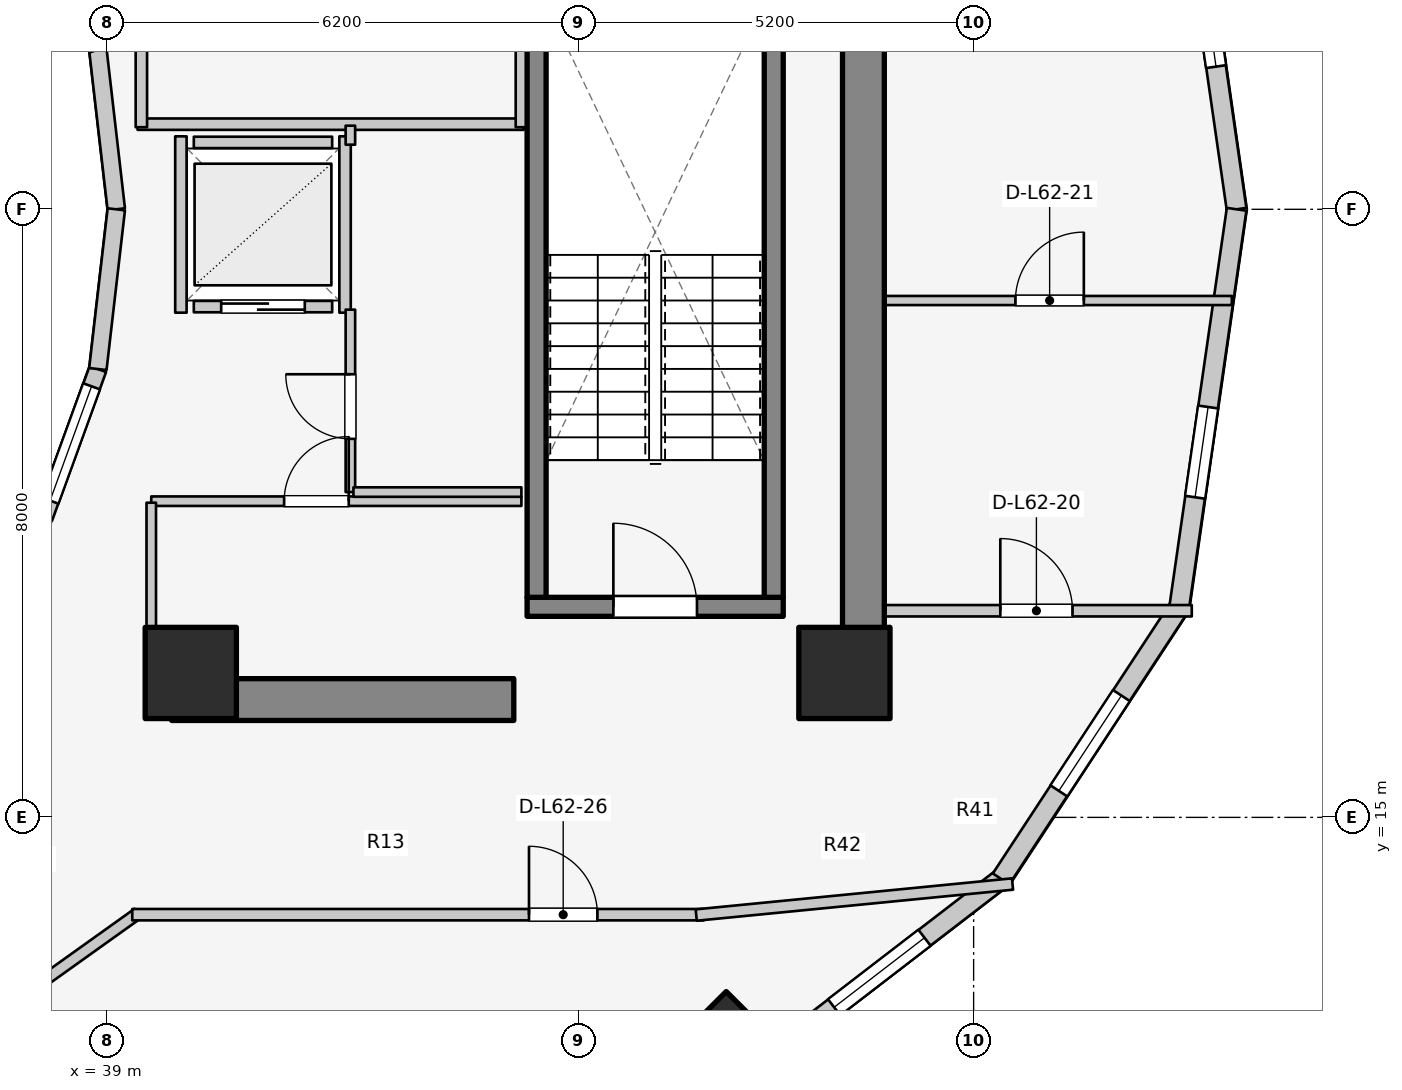
"""IFC4 building model, lengths in metres.
Left out: names, types, materials, properties, quantities, classifications, styles, units other than length and angle.
Written with IfcOpenShell. Run it as: python <this file> out.ifc"""

import sys

from ifc_helpers import new_model, si_unit, direction, frame, frame_2d, origin, origin_2d, place, context, subcontext, project, spatial, rectangle, extrude, element, fill, save


model = new_model("IFC4")
c1 = context("Model", 3, precision=1e-05, world=origin(), true_north=direction((0.0, 1.0)))
c2 = subcontext(c1, "Body", "Model", "MODEL_VIEW")
j1 = project(units=[si_unit("LENGTHUNIT", "METRE"), si_unit("PLANEANGLEUNIT", "RADIAN")], contexts=[c1])
p1 = place(None, origin())
s1 = spatial("IfcSite", under=j1, at=p1, CompositionType="ELEMENT")
p2 = place(p1, origin())
s2 = spatial("IfcBuilding", under=s1, at=p2, CompositionType="ELEMENT")
p3 = place(p2, frame((0.0, 0.0, 204.7)))
s3 = spatial("IfcBuildingStorey", under=s2, at=p3, CompositionType="ELEMENT", Elevation=204.7)
p4 = place(p3, frame((48.95, 17.05, 0.0), z_axis=(0.0, 0.0, 1.0), x_axis=(0.0, 1.0, 0.0)))
e1 = element("IfcWall", 1, at=p4, inside=s3, PredefinedType="SHEAR", context=c2, shape_type="SweptSolid", body=[
    extrude(rectangle(XDim=12.8, YDim=0.55, at=frame_2d((6.4, 0.0))), origin(), (0.0, 0.0, 1.0), 3.1),
])
p5 = place(p3, frame((39.85, 16.55, 0.0), z_axis=(0.0, 0.0, 1.0), x_axis=(1.0, 0.0, 0.0)))
e2 = element("IfcWall", 2, at=p5, inside=s3, PredefinedType="SHEAR", context=c2, shape_type="SweptSolid", body=[
    extrude(rectangle(XDim=4.5, YDim=0.55, at=frame_2d((2.25, 0.0))), origin(), (0.0, 0.0, 1.0), 3.1),
])
p6 = place(p3, frame((44.525, 17.77, 0.0), z_axis=(0.0, 0.0, 1.0), x_axis=(1.0, 0.0, 0.0)))
e3 = element("IfcWall", 3, at=p6, inside=s3, PredefinedType="SOLIDWALL", context=c2, shape_type="SweptSolid", body=[
    extrude(rectangle(XDim=3.37, YDim=0.25, at=frame_2d((1.685, 0.0))), origin(), (0.0, 0.0, 1.0), 3.1),
])
p7 = place(p6, frame((1.135, 0.0, 0.0)))
e4 = element("IfcOpeningElement", 4, at=p7, cuts=e3, PredefinedType="OPENING", context=c2, shape_type="SweptSolid", body=[
    extrude(rectangle(XDim=1.1, YDim=2.1, at=frame_2d((0.55, 1.05))), frame((0.0, 0.135, 0.0), z_axis=(0.0, -1.0, 0.0), x_axis=(1.0, 0.0, 0.0)), (0.0, 0.0, 1.0), 0.27),
])
for number, where, z_axis, x_axis in (
    (5, (44.65, 17.895, 0.0), (0.0, 0.0, 1.0), (0.0, 1.0, 0.0)),
    (6, (47.77, 17.895, 0.0), (0.0, 0.0, 1.0), (0.0, 1.0, 0.0)),
):
    element("IfcWall", number, at=place(p3, frame(where, z_axis=z_axis, x_axis=x_axis)), inside=s3, PredefinedType="SOLIDWALL", context=c2, shape_type="SweptSolid", body=[
        extrude(rectangle(XDim=7.81, YDim=0.25, at=frame_2d((3.905, 0.0))), origin(), (0.0, 0.0, 1.0), 3.1),
    ])
for number, where, z_axis, x_axis in (
    (7, (40.1, 16.9, 0.0), (0.0, 0.0, 1.0), (1.0, 0.0, 0.0)),
    (8, (48.7, 16.9, 0.0), (0.0, 0.0, 1.0), (1.0, 0.0, 0.0)),
):
    element("IfcColumn", number, at=place(p3, frame(where, z_axis=z_axis, x_axis=x_axis)), inside=s3, PredefinedType="COLUMN", context=c2, shape_type="SweptSolid", body=[
        extrude(rectangle(XDim=1.2, YDim=1.2, at=origin_2d()), origin(), (0.0, 0.0, 1.0), 3.1),
    ])
p8 = place(p3, frame((47.145, 12.143, 0.0), z_axis=(0.0, 0.0, 1.0), x_axis=(0.707106781187, -0.707106781187, 0.0)))
e9 = element("IfcColumn", 9, at=p8, inside=s3, PredefinedType="COLUMN", context=c2, shape_type="SweptSolid", body=[
    extrude(rectangle(XDim=0.8, YDim=0.8, at=origin_2d()), origin(), (0.0, 0.0, 1.0), 3.1),
])
p9 = place(p3, frame((39.12, 23.0, 0.0), z_axis=(0.0, 0.0, 1.0), x_axis=(-0.114711713601, 0.993398823617, 0.0)))
e10 = element("IfcWall", 10, at=p9, inside=s3, PredefinedType="STANDARD", context=c2, shape_type="SweptSolid", body=[
    extrude(rectangle(XDim=2.115, YDim=0.23, at=frame_2d((1.058, 0.0))), origin(), (0.0, 0.0, 1.0), 2.84),
])
p10 = place(p3, frame((38.166, 18.94, 0.0), z_axis=(0.0, 0.0, 1.0), x_axis=(0.341423187295, 0.93990968033, 0.0)))
e11 = element("IfcWall", 11, at=p10, inside=s3, PredefinedType="STANDARD", context=c2, shape_type="SweptSolid", body=[
    extrude(rectangle(XDim=2.084, YDim=0.23, at=frame_2d((1.042, 0.0))), origin(), (0.0, 0.0, 1.0), 2.84),
])
p11 = place(p10, frame((0.242, 0.0, 0.85)))
e12 = element("IfcOpeningElement", 12, at=p11, cuts=e11, PredefinedType="OPENING", context=c2, shape_type="SweptSolid", body=[
    extrude(rectangle(XDim=1.6, YDim=1.65, at=frame_2d((0.8, 0.825))), frame((0.0, 0.125, 0.0), z_axis=(0.0, -1.0, 0.0), x_axis=(1.0, 0.0, 0.0)), (0.0, 0.0, 1.0), 0.25),
])
p12 = place(p3, frame((38.877, 20.898, 0.0), z_axis=(0.0, 0.0, 1.0), x_axis=(0.114711713601, 0.993398823617, 0.0)))
e13 = element("IfcWall", 13, at=p12, inside=s3, PredefinedType="STANDARD", context=c2, shape_type="SweptSolid", body=[
    extrude(rectangle(XDim=2.115, YDim=0.23, at=frame_2d((1.058, 0.0))), origin(), (0.0, 0.0, 1.0), 2.84),
])
p13 = place(p3, frame((53.86, 23.0, 0.0), z_axis=(0.0, 0.0, 1.0), x_axis=(-0.142712754019, 0.989764148593, 0.0)))
e14 = element("IfcWall", 14, at=p13, inside=s3, PredefinedType="STANDARD", context=c2, shape_type="SweptSolid", body=[
    extrude(rectangle(XDim=5.293, YDim=0.26, at=frame_2d((2.646, 0.0))), origin(), (0.0, 0.0, 1.0), 2.85),
])
p14 = place(p13, frame((1.896, 0.0, 0.75)))
e15 = element("IfcOpeningElement", 15, at=p14, cuts=e14, PredefinedType="OPENING", context=c2, shape_type="SweptSolid", body=[
    extrude(rectangle(XDim=1.5, YDim=1.6, at=frame_2d((0.75, 0.8))), frame((0.0, 0.14, 0.0), z_axis=(0.0, -1.0, 0.0), x_axis=(1.0, 0.0, 0.0)), (0.0, 0.0, 1.0), 0.28),
])
p15 = place(p3, frame((47.558, 11.728, 0.0), z_axis=(0.0, 0.0, 1.0), x_axis=(0.792713817907, 0.609593965603, 0.0)))
e16 = element("IfcWall", 16, at=p15, inside=s3, PredefinedType="STANDARD", context=c2, shape_type="SweptSolid", body=[
    extrude(rectangle(XDim=4.041, YDim=0.26, at=frame_2d((2.021, 0.0))), origin(), (0.0, 0.0, 1.0), 2.85),
])
p16 = place(p15, frame((1.271, 0.0, 0.75)))
e17 = element("IfcOpeningElement", 17, at=p16, cuts=e16, PredefinedType="OPENING", context=c2, shape_type="SweptSolid", body=[
    extrude(rectangle(XDim=1.5, YDim=1.6, at=frame_2d((0.75, 0.8))), frame((0.0, 0.14, 0.0), z_axis=(0.0, -1.0, 0.0), x_axis=(1.0, 0.0, 0.0)), (0.0, 0.0, 1.0), 0.28),
])
p17 = place(p3, frame((50.761, 14.191, 0.0), z_axis=(0.0, 0.0, 1.0), x_axis=(0.548776305075, 0.835969238064, 0.0)))
e18 = element("IfcWall", 18, at=p17, inside=s3, PredefinedType="STANDARD", context=c2, shape_type="SweptSolid", body=[
    extrude(rectangle(XDim=4.271, YDim=0.26, at=frame_2d((2.135, 0.0))), origin(), (0.0, 0.0, 1.0), 2.85),
])
p18 = place(p17, frame((1.385, 0.0, 0.75)))
e19 = element("IfcOpeningElement", 19, at=p18, cuts=e18, PredefinedType="OPENING", context=c2, shape_type="SweptSolid", body=[
    extrude(rectangle(XDim=1.5, YDim=1.6, at=frame_2d((0.75, 0.8))), frame((0.0, 0.14, 0.0), z_axis=(0.0, -1.0, 0.0), x_axis=(1.0, 0.0, 0.0)), (0.0, 0.0, 1.0), 0.28),
])
p19 = place(p3, frame((53.105, 17.761, 0.0), z_axis=(0.0, 0.0, 1.0), x_axis=(0.142712754019, 0.989764148593, 0.0)))
e20 = element("IfcWall", 20, at=p19, inside=s3, PredefinedType="STANDARD", context=c2, shape_type="SweptSolid", body=[
    extrude(rectangle(XDim=5.293, YDim=0.26, at=frame_2d((2.646, 0.0))), origin(), (0.0, 0.0, 1.0), 2.85),
])
p20 = place(p19, frame((1.465, 0.0, 0.75)))
e21 = element("IfcOpeningElement", 21, at=p20, cuts=e20, PredefinedType="OPENING", context=c2, shape_type="SweptSolid", body=[
    extrude(rectangle(XDim=1.2, YDim=1.5, at=frame_2d((0.6, 0.75))), frame((0.0, 0.14, 0.0), z_axis=(0.0, -1.0, 0.0), x_axis=(1.0, 0.0, 0.0)), (0.0, 0.0, 1.0), 0.28),
])
p21 = place(p3, frame((40.14, 21.72, 0.0), z_axis=(0.0, 0.0, 1.0), x_axis=(1.0, 0.0, 0.0)))
e22 = element("IfcWall", 22, at=p21, inside=s3, PredefinedType="SOLIDWALL", context=c2, shape_type="SweptSolid", body=[
    extrude(rectangle(XDim=1.82, YDim=0.15, at=frame_2d((0.91, 0.0))), origin(), (0.0, 0.0, 1.0), 2.12),
])
p22 = place(p21, frame((0.36, 0.0, 0.0)))
e23 = element("IfcOpeningElement", 23, at=p22, cuts=e22, PredefinedType="OPENING", context=c2, shape_type="SweptSolid", body=[
    extrude(rectangle(XDim=1.1, YDim=2.1, at=frame_2d((0.55, 1.05))), frame((0.0, 0.085, 0.0), z_axis=(0.0, -1.0, 0.0), x_axis=(1.0, 0.0, 0.0)), (0.0, 0.0, 1.0), 0.17),
])
p23 = place(p3, frame((40.14, 23.88, 0.0), z_axis=(0.0, 0.0, 1.0), x_axis=(1.0, 0.0, 0.0)))
e24 = element("IfcWall", 24, at=p23, inside=s3, PredefinedType="SOLIDWALL", context=c2, shape_type="SweptSolid", body=[
    extrude(rectangle(XDim=1.82, YDim=0.15, at=frame_2d((0.91, 0.0))), origin(), (0.0, 0.0, 1.0), 2.12),
])
p24 = place(p3, frame((39.97, 21.64, 0.0), z_axis=(0.0, 0.0, 1.0), x_axis=(0.0, 1.0, 0.0)))
e25 = element("IfcWall", 25, at=p24, inside=s3, PredefinedType="SOLIDWALL", context=c2, shape_type="SweptSolid", body=[
    extrude(rectangle(XDim=2.32, YDim=0.15, at=frame_2d((1.16, 0.0))), origin(), (0.0, 0.0, 1.0), 2.12),
])
p25 = place(p3, frame((42.13, 21.64, 0.0), z_axis=(0.0, 0.0, 1.0), x_axis=(0.0, 1.0, 0.0)))
e26 = element("IfcWall", 26, at=p25, inside=s3, PredefinedType="SOLIDWALL", context=c2, shape_type="SweptSolid", body=[
    extrude(rectangle(XDim=2.32, YDim=0.15, at=frame_2d((1.16, 0.0))), origin(), (0.0, 0.0, 1.0), 2.855),
])
p26 = place(p3, frame((39.4, 24.12, 0.0), z_axis=(0.0, 0.0, 1.0), x_axis=(1.0, 0.0, 0.0)))
e27 = element("IfcWall", 27, at=p26, inside=s3, PredefinedType="PARTITIONING", context=c2, shape_type="SweptSolid", body=[
    extrude(rectangle(XDim=5.08, YDim=0.15, at=frame_2d((2.54, 0.0))), origin(), (0.0, 0.0, 1.0), 2.12),
])
p27 = place(p3, frame((44.45, 24.08, 0.0), z_axis=(0.0, 0.0, 1.0), x_axis=(0.0, 1.0, 0.0)))
e28 = element("IfcWall", 28, at=p27, inside=s3, PredefinedType="PARTITIONING", context=c2, shape_type="SweptSolid", body=[
    extrude(rectangle(XDim=3.2, YDim=0.15, at=frame_2d((1.6, 0.0))), origin(), (0.0, 0.0, 1.0), 2.855),
])
p28 = place(p3, frame((39.45, 24.08, 0.0), z_axis=(0.0, 0.0, 1.0), x_axis=(0.0, 1.0, 0.0)))
e29 = element("IfcWall", 29, at=p28, inside=s3, PredefinedType="PARTITIONING", context=c2, shape_type="SweptSolid", body=[
    extrude(rectangle(XDim=3.4, YDim=0.15, at=frame_2d((1.7, 0.0))), origin(), (0.0, 0.0, 1.0), 2.855),
])
p29 = place(p28, frame((1.894, 0.0, 0.0)))
e30 = element("IfcOpeningElement", 30, at=p29, cuts=e29, PredefinedType="OPENING", context=c2, shape_type="SweptSolid", body=[
    extrude(rectangle(XDim=1.1, YDim=2.1, at=frame_2d((0.55, 1.05))), frame((0.0, 0.085, 0.0), z_axis=(0.0, -1.0, 0.0), x_axis=(1.0, 0.0, 0.0)), (0.0, 0.0, 1.0), 0.17),
])
p30 = place(p3, frame((39.58, 19.16, 0.0), z_axis=(0.0, 0.0, 1.0), x_axis=(1.0, 0.0, 0.0)))
e31 = element("IfcWall", 31, at=p30, inside=s3, PredefinedType="PARTITIONING", context=c2, shape_type="SweptSolid", body=[
    extrude(rectangle(XDim=4.87, YDim=0.125, at=frame_2d((2.435, 0.0))), origin(), (0.0, 0.0, 1.0), 2.12),
])
p31 = place(p30, frame((1.748, 0.0, 0.0)))
e32 = element("IfcOpeningElement", 32, at=p31, cuts=e31, PredefinedType="OPENING", context=c2, shape_type="SweptSolid", body=[
    extrude(rectangle(XDim=0.85, YDim=2.05, at=frame_2d((0.425, 1.025))), frame((0.0, 0.073, 0.0), z_axis=(0.0, -1.0, 0.0), x_axis=(1.0, 0.0, 0.0)), (0.0, 0.0, 1.0), 0.145),
])
p32 = place(p3, frame((39.58, 17.1, 0.0), z_axis=(0.0, 0.0, 1.0), x_axis=(0.0, 1.0, 0.0)))
e33 = element("IfcWall", 33, at=p32, inside=s3, PredefinedType="PARTITIONING", context=c2, shape_type="SweptSolid", body=[
    extrude(rectangle(XDim=2.04, YDim=0.125, at=frame_2d((1.02, 0.0))), origin(), (0.0, 0.0, 1.0), 2.232),
])
p33 = place(p3, frame((42.2, 19.28, 0.0), z_axis=(0.0, 0.0, 1.0), x_axis=(0.0, 1.0, 0.0)))
e34 = element("IfcWall", 34, at=p33, inside=s3, PredefinedType="PARTITIONING", context=c2, shape_type="SweptSolid", body=[
    extrude(rectangle(XDim=2.4, YDim=0.125, at=frame_2d((1.2, 0.0))), origin(), (0.0, 0.0, 1.0), 2.855),
])
p34 = place(p33, frame((0.7, 0.0, 0.0)))
e35 = element("IfcOpeningElement", 35, at=p34, cuts=e34, PredefinedType="OPENING", context=c2, shape_type="SweptSolid", body=[
    extrude(rectangle(XDim=0.85, YDim=2.05, at=frame_2d((0.425, 1.025))), frame((0.0, 0.073, 0.0), z_axis=(0.0, -1.0, 0.0), x_axis=(1.0, 0.0, 0.0)), (0.0, 0.0, 1.0), 0.145),
])
p35 = place(p3, frame((42.2, 23.85, 0.0), z_axis=(0.0, 0.0, 1.0), x_axis=(0.0, 1.0, 0.0)))
e36 = element("IfcWall", 36, at=p35, inside=s3, PredefinedType="PARTITIONING", context=c2, shape_type="SweptSolid", body=[
    extrude(rectangle(XDim=0.25, YDim=0.125, at=frame_2d((0.125, 0.0))), origin(), (0.0, 0.0, 1.0), 2.855),
])
p36 = place(p3, frame((42.24, 19.28, 0.0), z_axis=(0.0, 0.0, 1.0), x_axis=(1.0, 0.0, 0.0)))
e37 = element("IfcWall", 37, at=p36, inside=s3, PredefinedType="PARTITIONING", context=c2, shape_type="SweptSolid", body=[
    extrude(rectangle(XDim=2.21, YDim=0.125, at=frame_2d((1.105, 0.0))), origin(), (0.0, 0.0, 1.0), 2.12),
])
p37 = place(p3, frame((48.95, 17.719, 0.0), z_axis=(0.0, 0.0, 1.0), x_axis=(1.0, 0.0, 0.0)))
e38 = element("IfcWall", 38, at=p37, inside=s3, PredefinedType="PARTITIONING", context=c2, shape_type="SweptSolid", body=[
    extrude(rectangle(XDim=4.32, YDim=0.15, at=frame_2d((2.16, 0.0))), origin(), (0.0, 0.0, 1.0), 2.855),
])
p38 = place(p37, frame((1.801, 0.0, 0.0)))
e39 = element("IfcOpeningElement", 39, at=p38, cuts=e38, PredefinedType="OPENING", context=c2, shape_type="SweptSolid", body=[
    extrude(rectangle(XDim=0.95, YDim=2.1, at=frame_2d((0.475, 1.05))), frame((0.0, 0.085, 0.0), z_axis=(0.0, -1.0, 0.0), x_axis=(1.0, 0.0, 0.0)), (0.0, 0.0, 1.0), 0.17),
])
p39 = place(p3, frame((48.95, 21.8, 0.0), z_axis=(0.0, 0.0, 1.0), x_axis=(1.0, 0.0, 0.0)))
e40 = element("IfcWall", 40, at=p39, inside=s3, PredefinedType="MOVABLE", context=c2, shape_type="SweptSolid", body=[
    extrude(rectangle(XDim=4.847, YDim=0.12, at=frame_2d((2.424, 0.0))), origin(), (0.0, 0.0, 1.0), 2.855),
])
p40 = place(p39, frame((2.0, 0.0, 0.0)))
e41 = element("IfcOpeningElement", 41, at=p40, cuts=e40, PredefinedType="OPENING", context=c2, shape_type="SweptSolid", body=[
    extrude(rectangle(XDim=0.9, YDim=2.1, at=frame_2d((0.45, 1.05))), frame((0.0, 0.07, 0.0), z_axis=(0.0, -1.0, 0.0), x_axis=(1.0, 0.0, 0.0)), (0.0, 0.0, 1.0), 0.14),
])
p41 = place(p3, frame((37.71, 12.527, 0.0), z_axis=(0.0, 0.0, 1.0), x_axis=(0.813780999276, 0.581171648669, 0.0)))
e42 = element("IfcWall", 42, at=p41, inside=s3, PredefinedType="PARTITIONING", context=c2, shape_type="SweptSolid", body=[
    extrude(rectangle(XDim=2.082, YDim=0.15, at=frame_2d((1.041, 0.0))), origin(), (0.0, 0.0, 1.0), 2.376),
])
p42 = place(p3, frame((39.33, 13.72, 0.0), z_axis=(0.0, 0.0, 1.0), x_axis=(1.0, 0.0, 0.0)))
e43 = element("IfcWall", 43, at=p42, inside=s3, PredefinedType="PARTITIONING", context=c2, shape_type="SweptSolid", body=[
    extrude(rectangle(XDim=7.52, YDim=0.15, at=frame_2d((3.76, 0.0))), origin(), (0.0, 0.0, 1.0), 2.376),
])
p43 = place(p42, frame((5.22, 0.0, 0.0)))
e44 = element("IfcOpeningElement", 44, at=p43, cuts=e43, PredefinedType="OPENING", context=c2, shape_type="SweptSolid", body=[
    extrude(rectangle(XDim=0.9, YDim=2.1, at=frame_2d((0.45, 1.05))), frame((0.0, 0.085, 0.0), z_axis=(0.0, -1.0, 0.0), x_axis=(1.0, 0.0, 0.0)), (0.0, 0.0, 1.0), 0.17),
])
p44 = place(p3, frame((46.75, 13.715, 0.0), z_axis=(0.0, 0.0, 1.0), x_axis=(0.995223854991, 0.097619047609, 0.0)))
e45 = element("IfcWall", 45, at=p44, inside=s3, PredefinedType="PARTITIONING", context=c2, shape_type="SweptSolid", body=[
    extrude(rectangle(XDim=4.182, YDim=0.15, at=frame_2d((2.091, 0.0))), origin(), (0.0, 0.0, 1.0), 2.22),
])
p45 = place(p3, frame((37.717, 12.478, 0.0), z_axis=(0.0, 0.0, 1.0), x_axis=(0.951711719757, -0.306993163568, 0.0)))
e46 = element("IfcWall", 46, at=p45, inside=s3, PredefinedType="PARTITIONING", context=c2, shape_type="SweptSolid", body=[
    extrude(rectangle(XDim=5.934, YDim=0.125, at=frame_2d((2.967, 0.0))), origin(), (0.0, 0.0, 1.0), 2.376),
])
p46 = place(p11, origin())
e47 = element("IfcWindow", 47, at=p46, inside=s3, PartitioningType="SINGLE_PANEL", PredefinedType="WINDOW", context=c2, shape_type="SweptSolid", body=[
    extrude(rectangle(XDim=1.6, YDim=1.65, at=frame_2d((0.8, 0.825))), frame((0.0, 0.03, 0.0), z_axis=(0.0, -1.0, 0.0), x_axis=(1.0, 0.0, 0.0)), (0.0, 0.0, 1.0), 0.06),
])
fill(e12, e47)
p47 = place(p14, origin())
e48 = element("IfcWindow", 48, at=p47, inside=s3, PartitioningType="SINGLE_PANEL", PredefinedType="WINDOW", context=c2, shape_type="SweptSolid", body=[
    extrude(rectangle(XDim=1.5, YDim=1.6, at=frame_2d((0.75, 0.8))), frame((0.0, 0.03, 0.0), z_axis=(0.0, -1.0, 0.0), x_axis=(1.0, 0.0, 0.0)), (0.0, 0.0, 1.0), 0.06),
])
fill(e15, e48)
p48 = place(p16, origin())
e49 = element("IfcWindow", 49, at=p48, inside=s3, PartitioningType="SINGLE_PANEL", PredefinedType="WINDOW", context=c2, shape_type="SweptSolid", body=[
    extrude(rectangle(XDim=1.5, YDim=1.6, at=frame_2d((0.75, 0.8))), frame((0.0, 0.03, 0.0), z_axis=(0.0, -1.0, 0.0), x_axis=(1.0, 0.0, 0.0)), (0.0, 0.0, 1.0), 0.06),
])
fill(e17, e49)
p49 = place(p18, origin())
e50 = element("IfcWindow", 50, at=p49, inside=s3, PartitioningType="SINGLE_PANEL", PredefinedType="WINDOW", context=c2, shape_type="SweptSolid", body=[
    extrude(rectangle(XDim=1.5, YDim=1.6, at=frame_2d((0.75, 0.8))), frame((0.0, 0.03, 0.0), z_axis=(0.0, -1.0, 0.0), x_axis=(1.0, 0.0, 0.0)), (0.0, 0.0, 1.0), 0.06),
])
fill(e19, e50)
p50 = place(p20, origin())
e51 = element("IfcWindow", 51, at=p50, inside=s3, PartitioningType="SINGLE_PANEL", PredefinedType="WINDOW", context=c2, shape_type="SweptSolid", body=[
    extrude(rectangle(XDim=1.2, YDim=1.5, at=frame_2d((0.6, 0.75))), frame((0.0, 0.03, 0.0), z_axis=(0.0, -1.0, 0.0), x_axis=(1.0, 0.0, 0.0)), (0.0, 0.0, 1.0), 0.06),
])
fill(e21, e51)
p51 = place(p7, origin())
e52 = element("IfcDoor", 52, at=p51, inside=s3, OperationType="SINGLE_SWING_LEFT", PredefinedType="DOOR", context=c2, shape_type="SweptSolid", body=[
    extrude(rectangle(XDim=1.1, YDim=2.1, at=frame_2d((0.55, 1.05))), frame((0.0, 0.025, 0.0), z_axis=(0.0, -1.0, 0.0), x_axis=(1.0, 0.0, 0.0)), (0.0, 0.0, 1.0), 0.05),
])
fill(e4, e52)
p52 = place(p22, origin())
e53 = element("IfcDoor", 53, at=p52, inside=s3, OperationType="DOUBLE_DOOR_SLIDING", PredefinedType="DOOR", context=c2, shape_type="SweptSolid", body=[
    extrude(rectangle(XDim=1.1, YDim=2.1, at=frame_2d((0.55, 1.05))), frame((0.0, 0.025, 0.0), z_axis=(0.0, -1.0, 0.0), x_axis=(1.0, 0.0, 0.0)), (0.0, 0.0, 1.0), 0.05),
])
fill(e23, e53)
p53 = place(p31, origin())
e54 = element("IfcDoor", 54, at=p53, inside=s3, OperationType="SINGLE_SWING_RIGHT", PredefinedType="DOOR", context=c2, shape_type="SweptSolid", body=[
    extrude(rectangle(XDim=0.85, YDim=2.05, at=frame_2d((0.425, 1.025))), frame((0.0, 0.025, 0.0), z_axis=(0.0, -1.0, 0.0), x_axis=(1.0, 0.0, 0.0)), (0.0, 0.0, 1.0), 0.05),
])
fill(e32, e54)
p54 = place(p34, origin())
e55 = element("IfcDoor", 55, at=p54, inside=s3, OperationType="SINGLE_SWING_RIGHT", PredefinedType="DOOR", context=c2, shape_type="SweptSolid", body=[
    extrude(rectangle(XDim=0.85, YDim=2.05, at=frame_2d((0.425, 1.025))), frame((0.0, 0.025, 0.0), z_axis=(0.0, -1.0, 0.0), x_axis=(1.0, 0.0, 0.0)), (0.0, 0.0, 1.0), 0.05),
])
fill(e35, e55)
p55 = place(p38, origin())
e56 = element("IfcDoor", 56, at=p55, inside=s3, OperationType="SINGLE_SWING_LEFT", PredefinedType="DOOR", context=c2, shape_type="SweptSolid", body=[
    extrude(rectangle(XDim=0.95, YDim=2.1, at=frame_2d((0.475, 1.05))), frame((0.0, 0.025, 0.0), z_axis=(0.0, -1.0, 0.0), x_axis=(1.0, 0.0, 0.0)), (0.0, 0.0, 1.0), 0.05),
])
fill(e39, e56)
p56 = place(p40, origin())
e57 = element("IfcDoor", 57, at=p56, inside=s3, OperationType="SINGLE_SWING_RIGHT", PredefinedType="DOOR", context=c2, shape_type="SweptSolid", body=[
    extrude(rectangle(XDim=0.9, YDim=2.1, at=frame_2d((0.45, 1.05))), frame((0.0, 0.025, 0.0), z_axis=(0.0, -1.0, 0.0), x_axis=(1.0, 0.0, 0.0)), (0.0, 0.0, 1.0), 0.05),
])
fill(e41, e57)
p57 = place(p43, origin())
e58 = element("IfcDoor", 58, at=p57, inside=s3, OperationType="SINGLE_SWING_LEFT", PredefinedType="DOOR", context=c2, shape_type="SweptSolid", body=[
    extrude(rectangle(XDim=0.9, YDim=2.1, at=frame_2d((0.45, 1.05))), frame((0.0, 0.025, 0.0), z_axis=(0.0, -1.0, 0.0), x_axis=(1.0, 0.0, 0.0)), (0.0, 0.0, 1.0), 0.05),
])
fill(e44, e58)
save(model, sys.argv[1])
